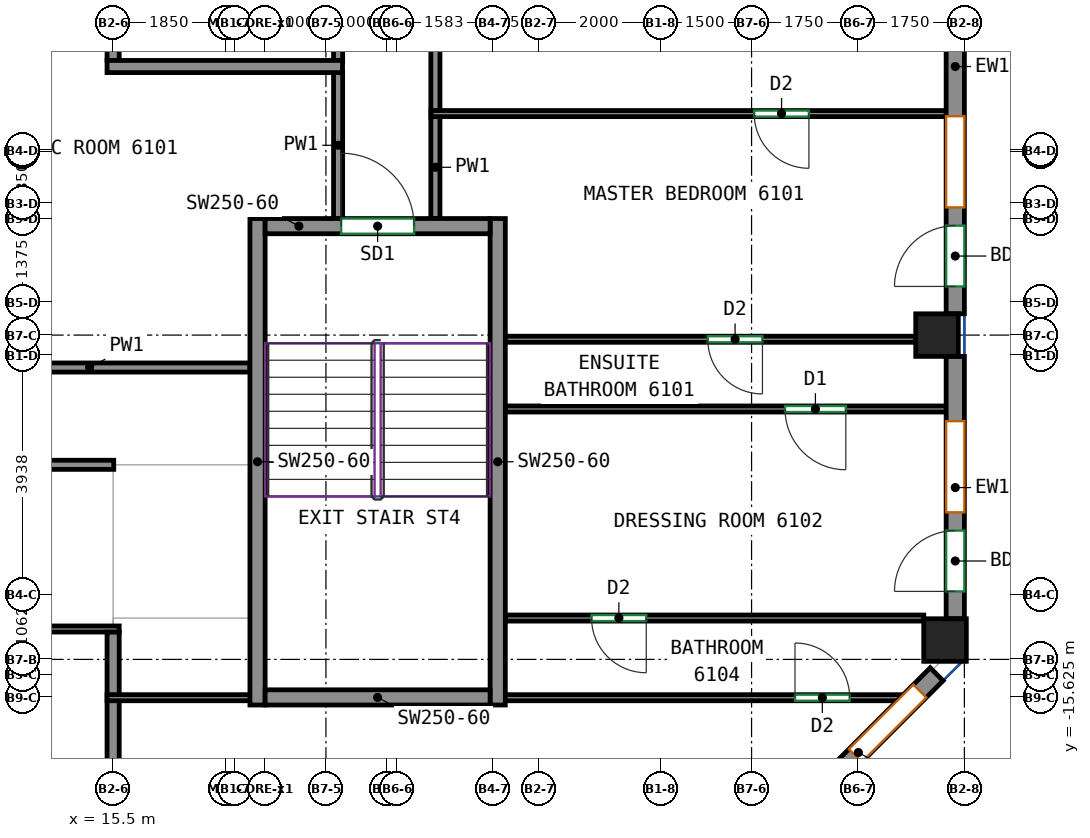
"""IFC4 building model, lengths in metres.
Left out: names, types, materials, properties, quantities, classifications, styles, units other than length and angle.
Written with IfcOpenShell. Run it as: python <this file> out.ifc"""

import sys

from ifc_helpers import new_model, si_unit, direction, frame, frame_2d, origin, origin_2d, place, context, subcontext, project, spatial, rectangle, extrude, source, transform, mapped, element, fill, save


model = new_model("IFC4")
c1 = context("Model", 3, precision=1e-05, world=origin(), true_north=direction((0.0, 1.0)))
c2 = subcontext(c1, "Body", "Model", "MODEL_VIEW")
j1 = project(units=[si_unit("LENGTHUNIT", "METRE"), si_unit("PLANEANGLEUNIT", "RADIAN")], contexts=[c1])
p1 = place(None, origin())
s1 = spatial("IfcSite", under=j1, at=p1, CompositionType="ELEMENT")
p2 = place(p1, origin())
s2 = spatial("IfcBuilding", under=s1, at=p2, CompositionType="ELEMENT")
p3 = place(p2, frame((0.0, 0.0, 252.6)))
s3 = spatial("IfcBuildingStorey", under=s2, at=p3, CompositionType="ELEMENT", Elevation=252.6)
m1 = source(origin(), c2, "Body", "SweptSolid", [
    extrude(rectangle(XDim=0.7, YDim=0.7, at=origin_2d()), origin(), (0.0, 0.0, 1.0), 3.12),
])
for number, where, z_axis, x_axis in (
    (1, (29.05, -9.667, 0.0), (0.0, 0.0, 1.0), (1.0, 0.0, 0.0)),
    (2, (29.182, -14.682, 0.0), (0.0, 0.0, 1.0), (1.0, 0.0, 0.0)),
):
    element("IfcColumn", number, at=place(p3, frame(where, z_axis=z_axis, x_axis=x_axis)), inside=s3, PredefinedType="COLUMN", context=c2, shape_type="MappedRepresentation", body=[
        mapped(m1, transform((0.0, 0.0, 0.0))),
    ])
m2 = source(origin(), c2, "Body", "SweptSolid", [
    extrude(rectangle(XDim=8.0, YDim=0.25, at=frame_2d((4.0, 0.0))), origin(), (0.0, 0.0, 1.0), 3.12),
])
for number, where, z_axis, x_axis in (
    (3, (17.875, -15.75, 0.0), (0.0, 0.0, 1.0), (0.0, 1.0, 0.0)),
    (4, (21.825, -15.75, 0.0), (0.0, 0.0, 1.0), (0.0, 1.0, 0.0)),
):
    element("IfcWall", number, at=place(p3, frame(where, z_axis=z_axis, x_axis=x_axis)), inside=s3, PredefinedType="SHEAR", context=c2, shape_type="MappedRepresentation", body=[
        mapped(m2, transform((0.0, 0.0, 0.0))),
    ])
m3 = source(origin(), c2, "Body", "SweptSolid", [
    extrude(rectangle(XDim=3.7, YDim=0.25, at=frame_2d((1.85, 0.0))), origin(), (0.0, 0.0, 1.0), 3.12),
])
p4 = place(p3, frame((18.0, -15.625, 0.0), z_axis=(0.0, 0.0, 1.0), x_axis=(1.0, 0.0, 0.0)))
e5 = element("IfcWall", 5, at=p4, inside=s3, PredefinedType="SHEAR", context=c2, shape_type="MappedRepresentation", body=[
    mapped(m3, transform((0.0, 0.0, 0.0))),
])
p5 = place(p3, frame((18.0, -7.875, 0.0), z_axis=(0.0, 0.0, 1.0), x_axis=(1.0, 0.0, 0.0)))
e6 = element("IfcWall", 6, at=p5, inside=s3, PredefinedType="SHEAR", context=c2, shape_type="MappedRepresentation", body=[
    mapped(m3, transform((0.0, 0.0, 0.0))),
])
p6 = place(p5, frame((1.25, 0.0, 0.0)))
e7 = element("IfcOpeningElement", 7, at=p6, cuts=e6, PredefinedType="OPENING", context=c2, shape_type="SweptSolid", body=[
    extrude(rectangle(XDim=1.2, YDim=2.1, at=frame_2d((0.6, 1.05))), frame((0.0, 0.135, 0.0), z_axis=(0.0, -1.0, 0.0), x_axis=(1.0, 0.0, 0.0)), (0.0, 0.0, 1.0), 0.27),
])
m4 = source(origin(), c2, "Body", "SweptSolid", [
    extrude(rectangle(XDim=3.642, YDim=0.3, at=frame_2d((1.821, 0.0))), origin(), (0.0, 0.0, 1.0), 3.12),
])
p7 = place(p3, frame((26.469, -17.819, 0.0), z_axis=(0.0, 0.0, 1.0), x_axis=(0.707106781187, 0.707106781187, 0.0)))
e8 = element("IfcWall", 8, at=p7, inside=s3, PredefinedType="SOLIDWALL", context=c2, shape_type="MappedRepresentation", body=[
    mapped(m4, transform((0.0, 0.0, 0.0))),
])
p8 = place(p7, frame((1.75, 0.0, 0.8)))
e9 = element("IfcOpeningElement", 9, at=p8, cuts=e8, PredefinedType="OPENING", context=c2, shape_type="SweptSolid", body=[
    extrude(rectangle(XDim=1.5, YDim=2.05, at=frame_2d((0.75, 1.025))), frame((0.0, 0.16, 0.0), z_axis=(0.0, -1.0, 0.0), x_axis=(1.0, 0.0, 0.0)), (0.0, 0.0, 1.0), 0.32),
])
m5 = source(origin(), c2, "Body", "SweptSolid", [
    extrude(rectangle(XDim=4.315, YDim=0.3, at=frame_2d((2.158, 0.0))), origin(), (0.0, 0.0, 1.0), 3.12),
])
p9 = place(p3, frame((29.35, -14.332, 0.0), z_axis=(0.0, 0.0, 1.0), x_axis=(0.0, 1.0, 0.0)))
e10 = element("IfcWall", 10, at=p9, inside=s3, PredefinedType="SOLIDWALL", context=c2, shape_type="MappedRepresentation", body=[
    mapped(m5, transform((0.0, 0.0, 0.0))),
])
p10 = place(p9, frame((1.75, 0.0, 0.8)))
e11 = element("IfcOpeningElement", 11, at=p10, cuts=e10, PredefinedType="OPENING", context=c2, shape_type="SweptSolid", body=[
    extrude(rectangle(XDim=1.5, YDim=2.05, at=frame_2d((0.75, 1.025))), frame((0.0, 0.16, 0.0), z_axis=(0.0, -1.0, 0.0), x_axis=(1.0, 0.0, 0.0)), (0.0, 0.0, 1.0), 0.32),
])
p11 = place(p9, frame((0.45, 0.0, 0.0)))
e12 = element("IfcOpeningElement", 12, at=p11, cuts=e10, PredefinedType="OPENING", context=c2, shape_type="SweptSolid", body=[
    extrude(rectangle(XDim=1.0, YDim=2.1, at=frame_2d((0.5, 1.05))), frame((0.0, 0.16, 0.0), z_axis=(0.0, -1.0, 0.0), x_axis=(1.0, 0.0, 0.0)), (0.0, 0.0, 1.0), 0.32),
])
m6 = source(origin(), c2, "Body", "SweptSolid", [
    extrude(rectangle(XDim=8.133, YDim=0.3, at=frame_2d((4.067, 0.0))), origin(), (0.0, 0.0, 1.0), 3.12),
])
p12 = place(p3, frame((29.35, -9.317, 0.0), z_axis=(0.0, 0.0, 1.0), x_axis=(0.0, 1.0, 0.0)))
e13 = element("IfcWall", 13, at=p12, inside=s3, PredefinedType="SOLIDWALL", context=c2, shape_type="MappedRepresentation", body=[
    mapped(m6, transform((0.0, 0.0, 0.0))),
])
p13 = place(p12, frame((1.75, 0.0, 0.8)))
e14 = element("IfcOpeningElement", 14, at=p13, cuts=e13, PredefinedType="OPENING", context=c2, shape_type="SweptSolid", body=[
    extrude(rectangle(XDim=1.5, YDim=2.05, at=frame_2d((0.75, 1.025))), frame((0.0, 0.16, 0.0), z_axis=(0.0, -1.0, 0.0), x_axis=(1.0, 0.0, 0.0)), (0.0, 0.0, 1.0), 0.32),
])
p14 = place(p12, frame((0.45, 0.0, 0.0)))
e15 = element("IfcOpeningElement", 15, at=p14, cuts=e13, PredefinedType="OPENING", context=c2, shape_type="SweptSolid", body=[
    extrude(rectangle(XDim=1.0, YDim=2.1, at=frame_2d((0.5, 1.05))), frame((0.0, 0.16, 0.0), z_axis=(0.0, -1.0, 0.0), x_axis=(1.0, 0.0, 0.0)), (0.0, 0.0, 1.0), 0.32),
])
p15 = place(p12, frame((5.817, 0.0, 0.8)))
e16 = element("IfcOpeningElement", 16, at=p15, cuts=e13, PredefinedType="OPENING", context=c2, shape_type="SweptSolid", body=[
    extrude(rectangle(XDim=1.5, YDim=2.05, at=frame_2d((0.75, 1.025))), frame((0.0, 0.16, 0.0), z_axis=(0.0, -1.0, 0.0), x_axis=(1.0, 0.0, 0.0)), (0.0, 0.0, 1.0), 0.32),
])
p16 = place(p3, frame((-11.8, -11.8, 0.0), z_axis=(0.0, 0.0, 1.0), x_axis=(1.0, 0.0, 0.0)))
e17 = element("IfcWall", 17, at=p16, inside=s3, PredefinedType="PARTITIONING", context=c2, shape_type="SweptSolid", body=[
    extrude(rectangle(XDim=27.31, YDim=0.15, at=frame_2d((13.655, 0.0))), origin(), (0.0, 0.0, 1.0), 3.12),
])
p17 = place(p16, frame((5.021, 0.0, 0.0)))
e18 = element("IfcOpeningElement", 18, at=p17, cuts=e17, PredefinedType="OPENING", context=c2, shape_type="SweptSolid", body=[
    extrude(rectangle(XDim=1.0, YDim=2.1, at=frame_2d((0.5, 1.05))), frame((0.0, 0.085, 0.0), z_axis=(0.0, -1.0, 0.0), x_axis=(1.0, 0.0, 0.0)), (0.0, 0.0, 1.0), 0.17),
])
p18 = place(p16, frame((18.457, 0.0, 0.0)))
e19 = element("IfcOpeningElement", 19, at=p18, cuts=e17, PredefinedType="OPENING", context=c2, shape_type="SweptSolid", body=[
    extrude(rectangle(XDim=1.0, YDim=2.1, at=frame_2d((0.5, 1.05))), frame((0.0, 0.085, 0.0), z_axis=(0.0, -1.0, 0.0), x_axis=(1.0, 0.0, 0.0)), (0.0, 0.0, 1.0), 0.17),
])
p19 = place(p3, frame((20.8, -7.75, 0.0), z_axis=(0.0, 0.0, 1.0), x_axis=(0.0, 1.0, 0.0)))
e20 = element("IfcWall", 20, at=p19, inside=s3, PredefinedType="PARTITIONING", context=c2, shape_type="SweptSolid", body=[
    extrude(rectangle(XDim=1.686, YDim=0.15, at=frame_2d((0.843, 0.0))), origin(), (0.0, 0.0, 1.0), 3.12),
])
p20 = place(p3, frame((20.8, -5.984, 0.0), z_axis=(0.0, 0.0, 1.0), x_axis=(0.0, 1.0, 0.0)))
e21 = element("IfcWall", 21, at=p20, inside=s3, PredefinedType="PARTITIONING", context=c2, shape_type="SweptSolid", body=[
    extrude(rectangle(XDim=5.16, YDim=0.15, at=frame_2d((2.58, 0.0))), origin(), (0.0, 0.0, 1.0), 3.12),
])
p21 = place(p3, frame((19.2, -7.75, 0.0), z_axis=(0.0, 0.0, 1.0), x_axis=(0.0, 1.0, 0.0)))
e22 = element("IfcWall", 22, at=p21, inside=s3, PredefinedType="PARTITIONING", context=c2, shape_type="SweptSolid", body=[
    extrude(rectangle(XDim=2.41, YDim=0.15, at=frame_2d((1.205, 0.0))), origin(), (0.0, 0.0, 1.0), 3.12),
])
p22 = place(p3, frame((12.475, -10.2, 0.0), z_axis=(0.0, 0.0, 1.0), x_axis=(1.0, 0.0, 0.0)))
e23 = element("IfcWall", 23, at=p22, inside=s3, PredefinedType="PARTITIONING", context=c2, shape_type="SweptSolid", body=[
    extrude(rectangle(XDim=5.275, YDim=0.15, at=frame_2d((2.637, 0.0))), origin(), (0.0, 0.0, 1.0), 3.12),
])
p23 = place(p3, frame((19.2, -5.16, 0.0), z_axis=(0.0, 0.0, 1.0), x_axis=(0.0, 1.0, 0.0)))
e24 = element("IfcWall", 24, at=p23, inside=s3, PredefinedType="PARTITIONING", context=c2, shape_type="SweptSolid", body=[
    extrude(rectangle(XDim=3.852, YDim=0.15, at=frame_2d((1.926, 0.0))), origin(), (0.0, 0.0, 1.0), 3.12),
])
p24 = place(p3, frame((-9.06, -14.5, 0.0), z_axis=(0.0, 0.0, 1.0), x_axis=(1.0, 0.0, 0.0)))
e25 = element("IfcWall", 25, at=p24, inside=s3, PredefinedType="PARTITIONING", context=c2, shape_type="SweptSolid", body=[
    extrude(rectangle(XDim=24.66, YDim=0.1, at=frame_2d((12.33, 0.0))), origin(), (0.0, 0.0, 1.0), 3.12),
])
p25 = place(p24, frame((0.924, 0.0, 0.0)))
e26 = element("IfcOpeningElement", 26, at=p25, cuts=e25, PredefinedType="OPENING", context=c2, shape_type="SweptSolid", body=[
    extrude(rectangle(XDim=1.0, YDim=2.1, at=frame_2d((0.5, 1.05))), frame((0.0, 0.06, 0.0), z_axis=(0.0, -1.0, 0.0), x_axis=(1.0, 0.0, 0.0)), (0.0, 0.0, 1.0), 0.12),
])
p26 = place(p24, frame((15.945, 0.0, 0.0)))
e27 = element("IfcOpeningElement", 27, at=p26, cuts=e25, PredefinedType="OPENING", context=c2, shape_type="SweptSolid", body=[
    extrude(rectangle(XDim=1.0, YDim=2.1, at=frame_2d((0.5, 1.05))), frame((0.0, 0.06, 0.0), z_axis=(0.0, -1.0, 0.0), x_axis=(1.0, 0.0, 0.0)), (0.0, 0.0, 1.0), 0.12),
])
p27 = place(p24, frame((18.387, 0.0, 0.0)))
e28 = element("IfcOpeningElement", 28, at=p27, cuts=e25, PredefinedType="OPENING", context=c2, shape_type="SweptSolid", body=[
    extrude(rectangle(XDim=1.0, YDim=2.1, at=frame_2d((0.5, 1.05))), frame((0.0, 0.06, 0.0), z_axis=(0.0, -1.0, 0.0), x_axis=(1.0, 0.0, 0.0)), (0.0, 0.0, 1.0), 0.12),
])
p28 = place(p3, frame((15.5, -18.25, 0.0), z_axis=(0.0, 0.0, 1.0), x_axis=(0.0, 1.0, 0.0)))
e29 = element("IfcWall", 29, at=p28, inside=s3, PredefinedType="PARTITIONING", context=c2, shape_type="SweptSolid", body=[
    extrude(rectangle(XDim=2.58, YDim=0.2, at=frame_2d((1.29, 0.0))), origin(), (0.0, 0.0, 1.0), 3.12),
])
p29 = place(p3, frame((15.5, -15.59, 0.0), z_axis=(0.0, 0.0, 1.0), x_axis=(0.0, 1.0, 0.0)))
e30 = element("IfcWall", 30, at=p29, inside=s3, PredefinedType="PARTITIONING", context=c2, shape_type="SweptSolid", body=[
    extrude(rectangle(XDim=1.038, YDim=0.2, at=frame_2d((0.519, 0.0))), origin(), (0.0, 0.0, 1.0), 3.12),
])
p30 = place(p3, frame((21.9, -15.63, 0.0), z_axis=(0.0, 0.0, 1.0), x_axis=(1.0, 0.0, 0.0)))
e31 = element("IfcWall", 31, at=p30, inside=s3, PredefinedType="PARTITIONING", context=c2, shape_type="SweptSolid", body=[
    extrude(rectangle(XDim=6.616, YDim=0.1, at=frame_2d((3.308, 0.0))), origin(), (0.0, 0.0, 1.0), 3.12),
])
p31 = place(p30, frame((4.814, 0.0, 0.0)))
e32 = element("IfcOpeningElement", 32, at=p31, cuts=e31, PredefinedType="OPENING", context=c2, shape_type="SweptSolid", body=[
    extrude(rectangle(XDim=0.9, YDim=2.1, at=frame_2d((0.45, 1.05))), frame((0.0, 0.06, 0.0), z_axis=(0.0, -1.0, 0.0), x_axis=(1.0, 0.0, 0.0)), (0.0, 0.0, 1.0), 0.12),
])
p32 = place(p3, frame((15.4, -15.63, 0.0), z_axis=(0.0, 0.0, 1.0), x_axis=(1.0, 0.0, 0.0)))
e33 = element("IfcWall", 33, at=p32, inside=s3, PredefinedType="PARTITIONING", context=c2, shape_type="SweptSolid", body=[
    extrude(rectangle(XDim=2.4, YDim=0.1, at=frame_2d((1.2, 0.0))), origin(), (0.0, 0.0, 1.0), 3.12),
])
p33 = place(p3, frame((28.832, -14.32, 0.0), z_axis=(0.0, 0.0, 1.0), x_axis=(-1.0, 0.0, 0.0)))
e34 = element("IfcWall", 34, at=p33, inside=s3, PredefinedType="PARTITIONING", context=c2, shape_type="SweptSolid", body=[
    extrude(rectangle(XDim=6.882, YDim=0.1, at=frame_2d((3.441, 0.0))), origin(), (0.0, 0.0, 1.0), 3.12),
])
p34 = place(p33, frame((4.564, 0.0, 0.0)))
e35 = element("IfcOpeningElement", 35, at=p34, cuts=e34, PredefinedType="OPENING", context=c2, shape_type="SweptSolid", body=[
    extrude(rectangle(XDim=0.9, YDim=2.1, at=frame_2d((0.45, 1.05))), frame((0.0, 0.06, 0.0), z_axis=(0.0, -1.0, 0.0), x_axis=(1.0, 0.0, 0.0)), (0.0, 0.0, 1.0), 0.12),
])
p35 = place(p3, frame((29.25, -10.882, 0.0), z_axis=(0.0, 0.0, 1.0), x_axis=(-1.0, 0.0, 0.0)))
e36 = element("IfcWall", 36, at=p35, inside=s3, PredefinedType="PARTITIONING", context=c2, shape_type="SweptSolid", body=[
    extrude(rectangle(XDim=7.3, YDim=0.1, at=frame_2d((3.65, 0.0))), origin(), (0.0, 0.0, 1.0), 3.12),
])
p36 = place(p35, frame((1.7, 0.0, 0.0)))
e37 = element("IfcOpeningElement", 37, at=p36, cuts=e36, PredefinedType="OPENING", context=c2, shape_type="SweptSolid", body=[
    extrude(rectangle(XDim=1.0, YDim=2.1, at=frame_2d((0.5, 1.05))), frame((0.0, 0.06, 0.0), z_axis=(0.0, -1.0, 0.0), x_axis=(1.0, 0.0, 0.0)), (0.0, 0.0, 1.0), 0.12),
])
p37 = place(p3, frame((28.7, -9.735, 0.0), z_axis=(0.0, 0.0, 1.0), x_axis=(-1.0, 0.0, 0.0)))
e38 = element("IfcWall", 38, at=p37, inside=s3, PredefinedType="PARTITIONING", context=c2, shape_type="SweptSolid", body=[
    extrude(rectangle(XDim=6.75, YDim=0.1, at=frame_2d((3.375, 0.0))), origin(), (0.0, 0.0, 1.0), 3.12),
])
p38 = place(p37, frame((2.521, 0.0, 0.0)))
e39 = element("IfcOpeningElement", 39, at=p38, cuts=e38, PredefinedType="OPENING", context=c2, shape_type="SweptSolid", body=[
    extrude(rectangle(XDim=0.9, YDim=2.1, at=frame_2d((0.45, 1.05))), frame((0.0, 0.06, 0.0), z_axis=(0.0, -1.0, 0.0), x_axis=(1.0, 0.0, 0.0)), (0.0, 0.0, 1.0), 0.12),
])
p39 = place(p3, frame((29.25, -6.024, 0.0), z_axis=(0.0, 0.0, 1.0), x_axis=(-1.0, 0.0, 0.0)))
e40 = element("IfcWall", 40, at=p39, inside=s3, PredefinedType="PARTITIONING", context=c2, shape_type="SweptSolid", body=[
    extrude(rectangle(XDim=8.523, YDim=0.1, at=frame_2d((4.261, 0.0))), origin(), (0.0, 0.0, 1.0), 3.12),
])
p40 = place(p39, frame((2.307, 0.0, 0.0)))
e41 = element("IfcOpeningElement", 41, at=p40, cuts=e40, PredefinedType="OPENING", context=c2, shape_type="SweptSolid", body=[
    extrude(rectangle(XDim=0.9, YDim=2.1, at=frame_2d((0.45, 1.05))), frame((0.0, 0.06, 0.0), z_axis=(0.0, -1.0, 0.0), x_axis=(1.0, 0.0, 0.0)), (0.0, 0.0, 1.0), 0.12),
])
p41 = place(p3, frame((15.5, -5.15, 0.0), z_axis=(0.0, 0.0, 1.0), x_axis=(0.0, 1.0, 0.0)))
e42 = element("IfcWall", 42, at=p41, inside=s3, PredefinedType="PARTITIONING", context=c2, shape_type="SweptSolid", body=[
    extrude(rectangle(XDim=4.217, YDim=0.2, at=frame_2d((2.108, 0.0))), origin(), (0.0, 0.0, 1.0), 3.12),
])
p42 = place(p3, frame((15.4, -5.25, 0.0), z_axis=(0.0, 0.0, 1.0), x_axis=(1.0, 0.0, 0.0)))
e43 = element("IfcWall", 43, at=p42, inside=s3, PredefinedType="PARTITIONING", context=c2, shape_type="SweptSolid", body=[
    extrude(rectangle(XDim=3.873, YDim=0.2, at=frame_2d((1.937, 0.0))), origin(), (0.0, 0.0, 1.0), 3.12),
])
p43 = place(p8, origin())
e44 = element("IfcWindow", 44, at=p43, inside=s3, PartitioningType="SINGLE_PANEL", PredefinedType="WINDOW", context=c2, shape_type="SweptSolid", body=[
    extrude(rectangle(XDim=1.5, YDim=2.05, at=frame_2d((0.75, 1.025))), frame((0.0, 0.03, 0.0), z_axis=(0.0, -1.0, 0.0), x_axis=(1.0, 0.0, 0.0)), (0.0, 0.0, 1.0), 0.06),
])
fill(e9, e44)
p44 = place(p10, origin())
e45 = element("IfcWindow", 45, at=p44, inside=s3, PartitioningType="SINGLE_PANEL", PredefinedType="WINDOW", context=c2, shape_type="SweptSolid", body=[
    extrude(rectangle(XDim=1.5, YDim=2.05, at=frame_2d((0.75, 1.025))), frame((0.0, 0.03, 0.0), z_axis=(0.0, -1.0, 0.0), x_axis=(1.0, 0.0, 0.0)), (0.0, 0.0, 1.0), 0.06),
])
fill(e11, e45)
p45 = place(p11, origin())
e46 = element("IfcDoor", 46, at=p45, inside=s3, OperationType="SINGLE_SWING_LEFT", PredefinedType="DOOR", context=c2, shape_type="SweptSolid", body=[
    extrude(rectangle(XDim=1.0, YDim=2.1, at=frame_2d((0.5, 1.05))), frame((0.0, 0.025, 0.0), z_axis=(0.0, -1.0, 0.0), x_axis=(1.0, 0.0, 0.0)), (0.0, 0.0, 1.0), 0.05),
])
fill(e12, e46)
p46 = place(p13, origin())
e47 = element("IfcWindow", 47, at=p46, inside=s3, PartitioningType="SINGLE_PANEL", PredefinedType="WINDOW", context=c2, shape_type="SweptSolid", body=[
    extrude(rectangle(XDim=1.5, YDim=2.05, at=frame_2d((0.75, 1.025))), frame((0.0, 0.03, 0.0), z_axis=(0.0, -1.0, 0.0), x_axis=(1.0, 0.0, 0.0)), (0.0, 0.0, 1.0), 0.06),
])
fill(e14, e47)
p47 = place(p14, origin())
e48 = element("IfcDoor", 48, at=p47, inside=s3, OperationType="SINGLE_SWING_LEFT", PredefinedType="DOOR", context=c2, shape_type="SweptSolid", body=[
    extrude(rectangle(XDim=1.0, YDim=2.1, at=frame_2d((0.5, 1.05))), frame((0.0, 0.025, 0.0), z_axis=(0.0, -1.0, 0.0), x_axis=(1.0, 0.0, 0.0)), (0.0, 0.0, 1.0), 0.05),
])
fill(e15, e48)
p48 = place(p6, origin())
e49 = element("IfcDoor", 49, at=p48, inside=s3, OperationType="DOUBLE_DOOR_SINGLE_SWING", PredefinedType="DOOR", context=c2, shape_type="SweptSolid", body=[
    extrude(rectangle(XDim=1.2, YDim=2.1, at=frame_2d((0.6, 1.05))), frame((0.0, 0.025, 0.0), z_axis=(0.0, -1.0, 0.0), x_axis=(1.0, 0.0, 0.0)), (0.0, 0.0, 1.0), 0.05),
])
fill(e7, e49)
p49 = place(p31, origin())
e50 = element("IfcDoor", 50, at=p49, inside=s3, OperationType="SINGLE_SWING_LEFT", PredefinedType="DOOR", context=c2, shape_type="SweptSolid", body=[
    extrude(rectangle(XDim=0.9, YDim=2.1, at=frame_2d((0.45, 1.05))), frame((0.0, 0.025, 0.0), z_axis=(0.0, -1.0, 0.0), x_axis=(1.0, 0.0, 0.0)), (0.0, 0.0, 1.0), 0.05),
])
fill(e32, e50)
p50 = place(p34, origin())
e51 = element("IfcDoor", 51, at=p50, inside=s3, OperationType="SINGLE_SWING_LEFT", PredefinedType="DOOR", context=c2, shape_type="SweptSolid", body=[
    extrude(rectangle(XDim=0.9, YDim=2.1, at=frame_2d((0.45, 1.05))), frame((0.0, 0.025, 0.0), z_axis=(0.0, -1.0, 0.0), x_axis=(1.0, 0.0, 0.0)), (0.0, 0.0, 1.0), 0.05),
])
fill(e35, e51)
p51 = place(p36, origin())
e52 = element("IfcDoor", 52, at=p51, inside=s3, OperationType="SINGLE_SWING_LEFT", PredefinedType="DOOR", context=c2, shape_type="SweptSolid", body=[
    extrude(rectangle(XDim=1.0, YDim=2.1, at=frame_2d((0.5, 1.05))), frame((0.0, 0.025, 0.0), z_axis=(0.0, -1.0, 0.0), x_axis=(1.0, 0.0, 0.0)), (0.0, 0.0, 1.0), 0.05),
])
fill(e37, e52)
p52 = place(p38, origin())
e53 = element("IfcDoor", 53, at=p52, inside=s3, OperationType="SINGLE_SWING_LEFT", PredefinedType="DOOR", context=c2, shape_type="SweptSolid", body=[
    extrude(rectangle(XDim=0.9, YDim=2.1, at=frame_2d((0.45, 1.05))), frame((0.0, 0.025, 0.0), z_axis=(0.0, -1.0, 0.0), x_axis=(1.0, 0.0, 0.0)), (0.0, 0.0, 1.0), 0.05),
])
fill(e39, e53)
p53 = place(p40, origin())
e54 = element("IfcDoor", 54, at=p53, inside=s3, OperationType="SINGLE_SWING_LEFT", PredefinedType="DOOR", context=c2, shape_type="SweptSolid", body=[
    extrude(rectangle(XDim=0.9, YDim=2.1, at=frame_2d((0.45, 1.05))), frame((0.0, 0.025, 0.0), z_axis=(0.0, -1.0, 0.0), x_axis=(1.0, 0.0, 0.0)), (0.0, 0.0, 1.0), 0.05),
])
fill(e41, e54)
save(model, sys.argv[1])
